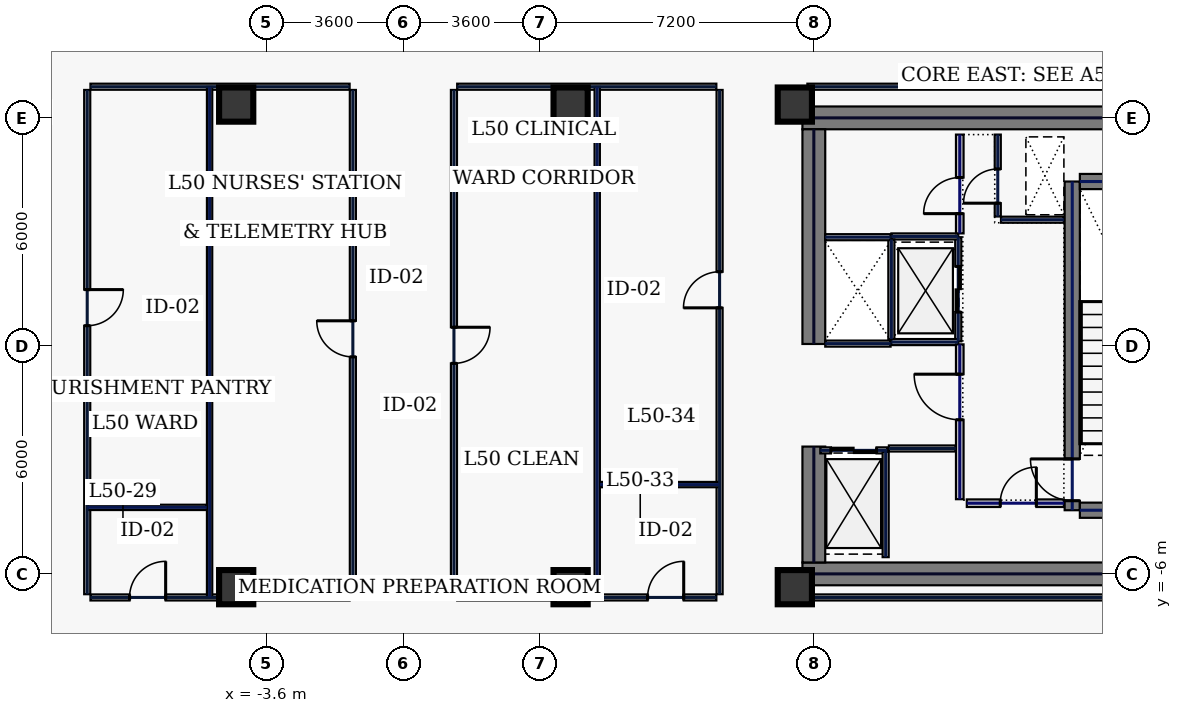
"""IFC4 building model, lengths in metres.
Left out: names, types, materials, properties, quantities, classifications, styles, units other than length and angle.
Written with IfcOpenShell. Run it as: python <this file> out.ifc"""

import sys

from ifc_helpers import new_model, si_unit, direction, frame, frame_2d, origin, origin_2d, place, context, subcontext, project, spatial, rectangle, hollow_rectangle, extrude, element, fill, save


model = new_model("IFC4")
c1 = context("Model", 3, precision=1e-05, world=origin(), true_north=direction((0.0, 1.0)))
c2 = subcontext(c1, "Body", "Model", "MODEL_VIEW")
j1 = project(units=[si_unit("LENGTHUNIT", "METRE"), si_unit("PLANEANGLEUNIT", "RADIAN")], contexts=[c1])
p1 = place(None, origin())
s1 = spatial("IfcSite", under=j1, at=p1, CompositionType="ELEMENT")
p2 = place(p1, origin())
s2 = spatial("IfcBuilding", under=s1, at=p2, CompositionType="ELEMENT")
p3 = place(p2, frame((0.0, 0.0, 218.2)))
s3 = spatial("IfcBuildingStorey", under=s2, at=p3, CompositionType="ELEMENT", Elevation=218.2)
for number, where, z_axis, x_axis in (
    (1, (10.5, 6.0, 0.0), (0.0, 0.0, 1.0), (1.0, 0.0, 0.0)),
    (2, (10.5, -6.0, 0.0), (0.0, 0.0, 1.0), (1.0, 0.0, 0.0)),
):
    element("IfcWall", number, at=place(p3, frame(where, z_axis=z_axis, x_axis=x_axis)), inside=s3, PredefinedType="SHEAR", context=c2, shape_type="SweptSolid", body=[
        extrude(rectangle(XDim=11.5, YDim=0.6, at=frame_2d((5.75, 0.0))), origin(), (0.0, 0.0, 1.0), 3.74),
    ])
p4 = place(p3, frame((10.8, -5.7, 0.0), z_axis=(0.0, 0.0, 1.0), x_axis=(0.0, 1.0, 0.0)))
e3 = element("IfcWall", 3, at=p4, inside=s3, PredefinedType="SHEAR", context=c2, shape_type="SweptSolid", body=[
    extrude(rectangle(XDim=3.05, YDim=0.6, at=frame_2d((1.525, 0.0))), origin(), (0.0, 0.0, 1.0), 3.74),
])
p5 = place(p3, frame((10.8, 0.05, 0.0), z_axis=(0.0, 0.0, 1.0), x_axis=(0.0, 1.0, 0.0)))
e4 = element("IfcWall", 4, at=p5, inside=s3, PredefinedType="SHEAR", context=c2, shape_type="SweptSolid", body=[
    extrude(rectangle(XDim=5.65, YDim=0.6, at=frame_2d((2.825, 0.0))), origin(), (0.0, 0.0, 1.0), 3.74),
])
p6 = place(p3, frame((17.6, -4.325, 0.0), z_axis=(0.0, 0.0, 1.0), x_axis=(0.0, 1.0, 0.0)))
e5 = element("IfcWall", 5, at=p6, inside=s3, PredefinedType="SHEAR", context=c2, shape_type="SweptSolid", body=[
    extrude(rectangle(XDim=8.65, YDim=0.4, at=frame_2d((4.325, 0.0))), origin(), (0.0, 0.0, 1.0), 3.74),
])
p7 = place(p6, frame((0.25, 0.0, 0.0)))
e6 = element("IfcOpeningElement", 6, at=p7, cuts=e5, PredefinedType="OPENING", context=c2, shape_type="SweptSolid", body=[
    extrude(rectangle(XDim=1.1, YDim=2.2, at=frame_2d((0.55, 1.1))), frame((0.0, 0.21, 0.0), z_axis=(0.0, -1.0, 0.0), x_axis=(1.0, 0.0, 0.0)), (0.0, 0.0, 1.0), 0.42),
])
for number, where, z_axis, x_axis in (
    (7, (17.8, -4.325, 0.0), (0.0, 0.0, 1.0), (1.0, 0.0, 0.0)),
    (8, (17.8, 4.325, 0.0), (0.0, 0.0, 1.0), (1.0, 0.0, 0.0)),
):
    element("IfcWall", number, at=place(p3, frame(where, z_axis=z_axis, x_axis=x_axis)), inside=s3, PredefinedType="SHEAR", context=c2, shape_type="SweptSolid", body=[
        extrude(rectangle(XDim=3.4, YDim=0.4, at=frame_2d((1.7, 0.0))), origin(), (0.0, 0.0, 1.0), 3.74),
    ])
for number, where, z_axis, x_axis in (
    (9, (10.3, -6.35, 0.0), (0.0, 0.0, 1.0), (1.0, 0.0, 0.0)),
    (10, (10.3, 6.35, 0.0), (0.0, 0.0, 1.0), (1.0, 0.0, 0.0)),
    (11, (-4.4, -6.35, 0.0), (0.0, 0.0, 1.0), (1.0, 0.0, 0.0)),
    (12, (4.4, -6.35, 0.0), (0.0, 0.0, 1.0), (1.0, 0.0, 0.0)),
    (13, (-4.4, 6.35, 0.0), (0.0, 0.0, 1.0), (1.0, 0.0, 0.0)),
    (14, (4.4, 6.35, 0.0), (0.0, 0.0, 1.0), (1.0, 0.0, 0.0)),
):
    element("IfcColumn", number, at=place(p3, frame(where, z_axis=z_axis, x_axis=x_axis)), inside=s3, PredefinedType="COLUMN", context=c2, shape_type="SweptSolid", body=[
        extrude(hollow_rectangle(XDim=0.9, YDim=0.9, WallThickness=0.04, at=origin_2d()), origin(), (0.0, 0.0, 1.0), 3.74),
    ])
p8 = place(p3, frame((14.6, 0.12, 0.0), z_axis=(0.0, 0.0, 1.0), x_axis=(0.0, 1.0, 0.0)))
e15 = element("IfcWall", 15, at=p8, inside=s3, PredefinedType="PARTITIONING", context=c2, shape_type="SweptSolid", body=[
    extrude(rectangle(XDim=2.74, YDim=0.16, at=frame_2d((1.37, 0.0))), origin(), (0.0, 0.0, 1.0), 3.74),
])
p9 = place(p8, frame((0.77, 0.0, 0.0)))
e16 = element("IfcOpeningElement", 16, at=p9, cuts=e15, PredefinedType="OPENING", context=c2, shape_type="SweptSolid", body=[
    extrude(rectangle(XDim=1.2, YDim=2.2, at=frame_2d((0.6, 1.1))), frame((0.0, 0.09, 0.0), z_axis=(0.0, -1.0, 0.0), x_axis=(1.0, 0.0, 0.0)), (0.0, 0.0, 1.0), 0.18),
])
for number, where, z_axis, x_axis in (
    (17, (12.84, 0.1, 0.0), (0.0, 0.0, 1.0), (1.0, 0.0, 0.0)),
    (18, (12.84, 2.88, 0.0), (0.0, 0.0, 1.0), (1.0, 0.0, 0.0)),
):
    element("IfcWall", number, at=place(p3, frame(where, z_axis=z_axis, x_axis=x_axis)), inside=s3, PredefinedType="PARTITIONING", context=c2, shape_type="SweptSolid", body=[
        extrude(rectangle(XDim=1.76, YDim=0.16, at=frame_2d((0.88, 0.0))), origin(), (0.0, 0.0, 1.0), 3.74),
    ])
p10 = place(p3, frame((12.84, 0.18, 0.0), z_axis=(0.0, 0.0, 1.0), x_axis=(0.0, 1.0, 0.0)))
e19 = element("IfcWall", 19, at=p10, inside=s3, PredefinedType="PARTITIONING", context=c2, shape_type="SweptSolid", body=[
    extrude(rectangle(XDim=2.62, YDim=0.16, at=frame_2d((1.31, 0.0))), origin(), (0.0, 0.0, 1.0), 3.74),
])
p11 = place(p3, frame((10.97, -2.75, 0.0), z_axis=(0.0, 0.0, 1.0), x_axis=(1.0, 0.0, 0.0)))
e20 = element("IfcWall", 20, at=p11, inside=s3, PredefinedType="PARTITIONING", context=c2, shape_type="SweptSolid", body=[
    extrude(rectangle(XDim=1.76, YDim=0.16, at=frame_2d((0.88, 0.0))), origin(), (0.0, 0.0, 1.0), 3.74),
])
p12 = place(p11, frame((0.28, 0.0, 0.0)))
e21 = element("IfcOpeningElement", 21, at=p12, cuts=e20, PredefinedType="OPENING", context=c2, shape_type="SweptSolid", body=[
    extrude(rectangle(XDim=1.2, YDim=2.2, at=frame_2d((0.6, 1.1))), frame((0.0, 0.09, 0.0), z_axis=(0.0, -1.0, 0.0), x_axis=(1.0, 0.0, 0.0)), (0.0, 0.0, 1.0), 0.18),
])
for number, where, z_axis, x_axis in (
    (22, (11.1, 0.06, 0.0), (0.0, 0.0, 1.0), (1.0, 0.0, 0.0)),
    (23, (11.1, 2.86, 0.0), (0.0, 0.0, 1.0), (1.0, 0.0, 0.0)),
):
    element("IfcWall", number, at=place(p3, frame(where, z_axis=z_axis, x_axis=x_axis)), inside=s3, PredefinedType="PARTITIONING", context=c2, shape_type="SweptSolid", body=[
        extrude(rectangle(XDim=1.72, YDim=0.16, at=frame_2d((0.86, 0.0))), origin(), (0.0, 0.0, 1.0), 3.74),
    ])
p13 = place(p3, frame((15.64, 3.405, 0.0), z_axis=(0.0, 0.0, 1.0), x_axis=(0.0, 1.0, 0.0)))
e24 = element("IfcWall", 24, at=p13, inside=s3, PredefinedType="PARTITIONING", context=c2, shape_type="SweptSolid", body=[
    extrude(rectangle(XDim=2.155, YDim=0.16, at=frame_2d((1.078, 0.0))), origin(), (0.0, 0.0, 1.0), 3.74),
])
p14 = place(p13, frame((0.35, 0.0, 0.0)))
e25 = element("IfcOpeningElement", 25, at=p14, cuts=e24, PredefinedType="OPENING", context=c2, shape_type="SweptSolid", body=[
    extrude(rectangle(XDim=0.9, YDim=2.2, at=frame_2d((0.45, 1.1))), frame((0.0, 0.09, 0.0), z_axis=(0.0, -1.0, 0.0), x_axis=(1.0, 0.0, 0.0)), (0.0, 0.0, 1.0), 0.18),
])
p15 = place(p3, frame((15.725, 3.32, 0.0), z_axis=(0.0, 0.0, 1.0), x_axis=(1.0, 0.0, 0.0)))
e26 = element("IfcWall", 26, at=p15, inside=s3, PredefinedType="PARTITIONING", context=c2, shape_type="SweptSolid", body=[
    extrude(rectangle(XDim=1.655, YDim=0.16, at=frame_2d((0.827, 0.0))), origin(), (0.0, 0.0, 1.0), 3.74),
])
p16 = place(p3, frame((14.825, -4.14, 0.0), z_axis=(0.0, 0.0, 1.0), x_axis=(1.0, 0.0, 0.0)))
e27 = element("IfcWall", 27, at=p16, inside=s3, PredefinedType="SOLIDWALL", context=c2, shape_type="SweptSolid", body=[
    extrude(rectangle(XDim=2.555, YDim=0.2, at=frame_2d((1.277, 0.0))), origin(), (0.0, 0.0, 1.0), 3.74),
])
p17 = place(p16, frame((0.88, 0.0, 0.0)))
e28 = element("IfcOpeningElement", 28, at=p17, cuts=e27, PredefinedType="OPENING", context=c2, shape_type="SweptSolid", body=[
    extrude(rectangle(XDim=0.95, YDim=2.2, at=frame_2d((0.475, 1.1))), frame((0.0, 0.11, 0.0), z_axis=(0.0, -1.0, 0.0), x_axis=(1.0, 0.0, 0.0)), (0.0, 0.0, 1.0), 0.22),
])
p18 = place(p3, frame((12.775, -2.7, 0.0), z_axis=(0.0, 0.0, 1.0), x_axis=(1.0, 0.0, 0.0)))
e29 = element("IfcWall", 29, at=p18, inside=s3, PredefinedType="PARTITIONING", context=c2, shape_type="SweptSolid", body=[
    extrude(rectangle(XDim=1.76, YDim=0.16, at=frame_2d((0.88, 0.0))), origin(), (0.0, 0.0, 1.0), 3.74),
])
p19 = place(p3, frame((12.69, -5.56, 0.0), z_axis=(0.0, 0.0, 1.0), x_axis=(0.0, 1.0, 0.0)))
e30 = element("IfcWall", 30, at=p19, inside=s3, PredefinedType="PARTITIONING", context=c2, shape_type="SweptSolid", body=[
    extrude(rectangle(XDim=2.775, YDim=0.16, at=frame_2d((1.388, 0.0))), origin(), (0.0, 0.0, 1.0), 3.74),
])
p20 = place(p3, frame((14.64, 2.96, 0.0), z_axis=(0.0, 0.0, 1.0), x_axis=(0.0, 1.0, 0.0)))
e31 = element("IfcWall", 31, at=p20, inside=s3, PredefinedType="SOLIDWALL", context=c2, shape_type="SweptSolid", body=[
    extrude(rectangle(XDim=2.6, YDim=0.2, at=frame_2d((1.3, 0.0))), origin(), (0.0, 0.0, 1.0), 3.74),
])
p21 = place(p20, frame((0.52, 0.0, 0.0)))
e32 = element("IfcOpeningElement", 32, at=p21, cuts=e31, PredefinedType="OPENING", context=c2, shape_type="SweptSolid", body=[
    extrude(rectangle(XDim=0.95, YDim=2.2, at=frame_2d((0.475, 1.1))), frame((0.0, 0.11, 0.0), z_axis=(0.0, -1.0, 0.0), x_axis=(1.0, 0.0, 0.0)), (0.0, 0.0, 1.0), 0.22),
])
p22 = place(p3, frame((14.64, -4.035, 0.0), z_axis=(0.0, 0.0, 1.0), x_axis=(0.0, 1.0, 0.0)))
e33 = element("IfcWall", 33, at=p22, inside=s3, PredefinedType="SOLIDWALL", context=c2, shape_type="SweptSolid", body=[
    extrude(rectangle(XDim=4.075, YDim=0.2, at=frame_2d((2.038, 0.0))), origin(), (0.0, 0.0, 1.0), 3.74),
])
p23 = place(p22, frame((2.09, 0.0, 0.0)))
e34 = element("IfcOpeningElement", 34, at=p23, cuts=e33, PredefinedType="OPENING", context=c2, shape_type="SweptSolid", body=[
    extrude(rectangle(XDim=1.2, YDim=2.2, at=frame_2d((0.6, 1.1))), frame((0.0, 0.11, 0.0), z_axis=(0.0, -1.0, 0.0), x_axis=(1.0, 0.0, 0.0)), (0.0, 0.0, 1.0), 0.22),
])
for number, where, z_axis, x_axis in (
    (35, (24.815, 6.82, 0.0), (0.0, 0.0, 1.0), (-1.0, 0.0, 0.0)),
    (36, (10.63, -6.62, 0.0), (0.0, 0.0, 1.0), (1.0, 0.0, 0.0)),
):
    element("IfcWall", number, at=place(p3, frame(where, z_axis=z_axis, x_axis=x_axis)), inside=s3, PredefinedType="PARTITIONING", context=c2, shape_type="SweptSolid", body=[
        extrude(rectangle(XDim=14.185, YDim=0.16, at=frame_2d((7.093, 0.0))), origin(), (0.0, 0.0, 1.0), 3.74),
    ])
p24 = place(p3, frame((8.235, 6.82, 0.0), z_axis=(0.0, 0.0, 1.0), x_axis=(-1.0, 0.0, 0.0)))
e37 = element("IfcWall", 37, at=p24, inside=s3, PredefinedType="PARTITIONING", context=c2, shape_type="SweptSolid", body=[
    extrude(rectangle(XDim=6.82, YDim=0.16, at=frame_2d((3.41, 0.0))), origin(), (0.0, 0.0, 1.0), 3.74),
])
p25 = place(p3, frame((1.33, 6.735, 0.0), z_axis=(0.0, 0.0, 1.0), x_axis=(0.0, -1.0, 0.0)))
e38 = element("IfcWall", 38, at=p25, inside=s3, PredefinedType="PARTITIONING", context=c2, shape_type="SweptSolid", body=[
    extrude(rectangle(XDim=13.27, YDim=0.16, at=frame_2d((6.635, 0.0))), origin(), (0.0, 0.0, 1.0), 3.74),
])
p26 = place(p25, frame((6.245, 0.0, 0.0)))
e39 = element("IfcOpeningElement", 39, at=p26, cuts=e38, PredefinedType="OPENING", context=c2, shape_type="SweptSolid", body=[
    extrude(rectangle(XDim=0.95, YDim=2.2, at=frame_2d((0.475, 1.1))), frame((0.0, 0.09, 0.0), z_axis=(0.0, -1.0, 0.0), x_axis=(1.0, 0.0, 0.0)), (0.0, 0.0, 1.0), 0.18),
])
p27 = place(p3, frame((1.415, -6.62, 0.0), z_axis=(0.0, 0.0, 1.0), x_axis=(1.0, 0.0, 0.0)))
e40 = element("IfcWall", 40, at=p27, inside=s3, PredefinedType="PARTITIONING", context=c2, shape_type="SweptSolid", body=[
    extrude(rectangle(XDim=6.82, YDim=0.16, at=frame_2d((3.41, 0.0))), origin(), (0.0, 0.0, 1.0), 3.74),
])
p28 = place(p27, frame((5.011, 0.0, 0.0)))
e41 = element("IfcOpeningElement", 41, at=p28, cuts=e40, PredefinedType="OPENING", context=c2, shape_type="SweptSolid", body=[
    extrude(rectangle(XDim=0.95, YDim=2.2, at=frame_2d((0.475, 1.1))), frame((0.0, 0.09, 0.0), z_axis=(0.0, -1.0, 0.0), x_axis=(1.0, 0.0, 0.0)), (0.0, 0.0, 1.0), 0.18),
])
p29 = place(p3, frame((8.32, -6.535, 0.0), z_axis=(0.0, 0.0, 1.0), x_axis=(0.0, 1.0, 0.0)))
e42 = element("IfcWall", 42, at=p29, inside=s3, PredefinedType="PARTITIONING", context=c2, shape_type="SweptSolid", body=[
    extrude(rectangle(XDim=13.27, YDim=0.16, at=frame_2d((6.635, 0.0))), origin(), (0.0, 0.0, 1.0), 3.74),
])
p30 = place(p29, frame((7.536, 0.0, 0.0)))
e43 = element("IfcOpeningElement", 43, at=p30, cuts=e42, PredefinedType="OPENING", context=c2, shape_type="SweptSolid", body=[
    extrude(rectangle(XDim=0.95, YDim=2.2, at=frame_2d((0.475, 1.1))), frame((0.0, 0.09, 0.0), z_axis=(0.0, -1.0, 0.0), x_axis=(1.0, 0.0, 0.0)), (0.0, 0.0, 1.0), 0.18),
])
p31 = place(p3, frame((-1.33, -6.535, 0.0), z_axis=(0.0, 0.0, 1.0), x_axis=(0.0, 1.0, 0.0)))
e44 = element("IfcWall", 44, at=p31, inside=s3, PredefinedType="PARTITIONING", context=c2, shape_type="SweptSolid", body=[
    extrude(rectangle(XDim=13.27, YDim=0.16, at=frame_2d((6.635, 0.0))), origin(), (0.0, 0.0, 1.0), 3.74),
])
p32 = place(p31, frame((6.245, 0.0, 0.0)))
e45 = element("IfcOpeningElement", 45, at=p32, cuts=e44, PredefinedType="OPENING", context=c2, shape_type="SweptSolid", body=[
    extrude(rectangle(XDim=0.95, YDim=2.2, at=frame_2d((0.475, 1.1))), frame((0.0, 0.09, 0.0), z_axis=(0.0, -1.0, 0.0), x_axis=(1.0, 0.0, 0.0)), (0.0, 0.0, 1.0), 0.18),
])
p33 = place(p3, frame((-1.415, 6.82, 0.0), z_axis=(0.0, 0.0, 1.0), x_axis=(-1.0, 0.0, 0.0)))
e46 = element("IfcWall", 46, at=p33, inside=s3, PredefinedType="PARTITIONING", context=c2, shape_type="SweptSolid", body=[
    extrude(rectangle(XDim=6.82, YDim=0.16, at=frame_2d((3.41, 0.0))), origin(), (0.0, 0.0, 1.0), 3.74),
])
p34 = place(p3, frame((-8.32, 6.735, 0.0), z_axis=(0.0, 0.0, 1.0), x_axis=(0.0, -1.0, 0.0)))
e47 = element("IfcWall", 47, at=p34, inside=s3, PredefinedType="PARTITIONING", context=c2, shape_type="SweptSolid", body=[
    extrude(rectangle(XDim=13.27, YDim=0.16, at=frame_2d((6.635, 0.0))), origin(), (0.0, 0.0, 1.0), 3.74),
])
p35 = place(p34, frame((5.254, 0.0, 0.0)))
e48 = element("IfcOpeningElement", 48, at=p35, cuts=e47, PredefinedType="OPENING", context=c2, shape_type="SweptSolid", body=[
    extrude(rectangle(XDim=0.95, YDim=2.2, at=frame_2d((0.475, 1.1))), frame((0.0, 0.09, 0.0), z_axis=(0.0, -1.0, 0.0), x_axis=(1.0, 0.0, 0.0)), (0.0, 0.0, 1.0), 0.18),
])
p36 = place(p3, frame((-8.235, -6.62, 0.0), z_axis=(0.0, 0.0, 1.0), x_axis=(1.0, 0.0, 0.0)))
e49 = element("IfcWall", 49, at=p36, inside=s3, PredefinedType="PARTITIONING", context=c2, shape_type="SweptSolid", body=[
    extrude(rectangle(XDim=6.82, YDim=0.16, at=frame_2d((3.41, 0.0))), origin(), (0.0, 0.0, 1.0), 3.74),
])
p37 = place(p36, frame((1.029, 0.0, 0.0)))
e50 = element("IfcOpeningElement", 50, at=p37, cuts=e49, PredefinedType="OPENING", context=c2, shape_type="SweptSolid", body=[
    extrude(rectangle(XDim=0.95, YDim=2.2, at=frame_2d((0.475, 1.1))), frame((0.0, 0.09, 0.0), z_axis=(0.0, -1.0, 0.0), x_axis=(1.0, 0.0, 0.0)), (0.0, 0.0, 1.0), 0.18),
])
for number, where, z_axis, x_axis in (
    (51, (-5.1, -6.615, 0.0), (0.0, 0.0, 1.0), (0.0, 1.0, 0.0)),
    (52, (5.1, -6.615, 0.0), (0.0, 0.0, 1.0), (0.0, 1.0, 0.0)),
):
    element("IfcWall", number, at=place(p3, frame(where, z_axis=z_axis, x_axis=x_axis)), inside=s3, PredefinedType="PARTITIONING", context=c2, shape_type="SweptSolid", body=[
        extrude(rectangle(XDim=13.43, YDim=0.14, at=frame_2d((6.715, 0.0))), origin(), (0.0, 0.0, 1.0), 3.74),
    ])
for number, where, z_axis, x_axis in (
    (53, (-8.315, -4.25, 0.0), (0.0, 0.0, 1.0), (1.0, 0.0, 0.0)),
    (54, (5.175, -3.65, 0.0), (0.0, 0.0, 1.0), (1.0, 0.0, 0.0)),
):
    element("IfcWall", number, at=place(p3, frame(where, z_axis=z_axis, x_axis=x_axis)), inside=s3, PredefinedType="PARTITIONING", context=c2, shape_type="SweptSolid", body=[
        extrude(rectangle(XDim=3.14, YDim=0.14, at=frame_2d((1.57, 0.0))), origin(), (0.0, 0.0, 1.0), 3.74),
    ])
p38 = place(p7, origin())
e55 = element("IfcDoor", 55, at=p38, inside=s3, OperationType="SINGLE_SWING_RIGHT", PredefinedType="DOOR", context=c2, shape_type="SweptSolid", body=[
    extrude(rectangle(XDim=1.1, YDim=2.2, at=frame_2d((0.55, 1.1))), frame((0.0, 0.025, 0.0), z_axis=(0.0, -1.0, 0.0), x_axis=(1.0, 0.0, 0.0)), (0.0, 0.0, 1.0), 0.05),
])
fill(e6, e55)
p39 = place(p9, origin())
e56 = element("IfcDoor", 56, at=p39, inside=s3, OperationType="SLIDING_TO_LEFT", PredefinedType="DOOR", context=c2, shape_type="SweptSolid", body=[
    extrude(rectangle(XDim=1.2, YDim=2.2, at=frame_2d((0.6, 1.1))), frame((0.0, 0.025, 0.0), z_axis=(0.0, -1.0, 0.0), x_axis=(1.0, 0.0, 0.0)), (0.0, 0.0, 1.0), 0.05),
])
fill(e16, e56)
p40 = place(p12, origin())
e57 = element("IfcDoor", 57, at=p40, inside=s3, OperationType="SLIDING_TO_LEFT", PredefinedType="DOOR", context=c2, shape_type="SweptSolid", body=[
    extrude(rectangle(XDim=1.2, YDim=2.2, at=frame_2d((0.6, 1.1))), frame((0.0, 0.025, 0.0), z_axis=(0.0, -1.0, 0.0), x_axis=(1.0, 0.0, 0.0)), (0.0, 0.0, 1.0), 0.05),
])
fill(e21, e57)
p41 = place(p14, origin())
e58 = element("IfcDoor", 58, at=p41, inside=s3, OperationType="SINGLE_SWING_LEFT", PredefinedType="DOOR", context=c2, shape_type="SweptSolid", body=[
    extrude(rectangle(XDim=0.9, YDim=2.2, at=frame_2d((0.45, 1.1))), frame((0.0, 0.025, 0.0), z_axis=(0.0, -1.0, 0.0), x_axis=(1.0, 0.0, 0.0)), (0.0, 0.0, 1.0), 0.05),
])
fill(e25, e58)
p42 = place(p17, origin())
e59 = element("IfcDoor", 59, at=p42, inside=s3, OperationType="SINGLE_SWING_RIGHT", PredefinedType="DOOR", context=c2, shape_type="SweptSolid", body=[
    extrude(rectangle(XDim=0.95, YDim=2.2, at=frame_2d((0.475, 1.1))), frame((0.0, 0.025, 0.0), z_axis=(0.0, -1.0, 0.0), x_axis=(1.0, 0.0, 0.0)), (0.0, 0.0, 1.0), 0.05),
])
fill(e28, e59)
p43 = place(p21, origin())
e60 = element("IfcDoor", 60, at=p43, inside=s3, OperationType="SINGLE_SWING_LEFT", PredefinedType="DOOR", context=c2, shape_type="SweptSolid", body=[
    extrude(rectangle(XDim=0.95, YDim=2.2, at=frame_2d((0.475, 1.1))), frame((0.0, 0.025, 0.0), z_axis=(0.0, -1.0, 0.0), x_axis=(1.0, 0.0, 0.0)), (0.0, 0.0, 1.0), 0.05),
])
fill(e32, e60)
p44 = place(p23, origin())
e61 = element("IfcDoor", 61, at=p44, inside=s3, OperationType="SINGLE_SWING_RIGHT", PredefinedType="DOOR", context=c2, shape_type="SweptSolid", body=[
    extrude(rectangle(XDim=1.2, YDim=2.2, at=frame_2d((0.6, 1.1))), frame((0.0, 0.025, 0.0), z_axis=(0.0, -1.0, 0.0), x_axis=(1.0, 0.0, 0.0)), (0.0, 0.0, 1.0), 0.05),
])
fill(e34, e61)
p45 = place(p37, origin())
e62 = element("IfcDoor", 62, at=p45, inside=s3, OperationType="SINGLE_SWING_RIGHT", PredefinedType="DOOR", context=c2, shape_type="SweptSolid", body=[
    extrude(rectangle(XDim=0.95, YDim=2.2, at=frame_2d((0.475, 1.1))), frame((0.0, 0.025, 0.0), z_axis=(0.0, -1.0, 0.0), x_axis=(1.0, 0.0, 0.0)), (0.0, 0.0, 1.0), 0.05),
])
fill(e50, e62)
p46 = place(p35, origin())
e63 = element("IfcDoor", 63, at=p46, inside=s3, OperationType="SINGLE_SWING_LEFT", PredefinedType="DOOR", context=c2, shape_type="SweptSolid", body=[
    extrude(rectangle(XDim=0.95, YDim=2.2, at=frame_2d((0.475, 1.1))), frame((0.0, 0.025, 0.0), z_axis=(0.0, -1.0, 0.0), x_axis=(1.0, 0.0, 0.0)), (0.0, 0.0, 1.0), 0.05),
])
fill(e48, e63)
p47 = place(p32, origin())
e64 = element("IfcDoor", 64, at=p47, inside=s3, OperationType="SINGLE_SWING_RIGHT", PredefinedType="DOOR", context=c2, shape_type="SweptSolid", body=[
    extrude(rectangle(XDim=0.95, YDim=2.2, at=frame_2d((0.475, 1.1))), frame((0.0, 0.025, 0.0), z_axis=(0.0, -1.0, 0.0), x_axis=(1.0, 0.0, 0.0)), (0.0, 0.0, 1.0), 0.05),
])
fill(e45, e64)
p48 = place(p26, origin())
e65 = element("IfcDoor", 65, at=p48, inside=s3, OperationType="SINGLE_SWING_LEFT", PredefinedType="DOOR", context=c2, shape_type="SweptSolid", body=[
    extrude(rectangle(XDim=0.95, YDim=2.2, at=frame_2d((0.475, 1.1))), frame((0.0, 0.025, 0.0), z_axis=(0.0, -1.0, 0.0), x_axis=(1.0, 0.0, 0.0)), (0.0, 0.0, 1.0), 0.05),
])
fill(e39, e65)
p49 = place(p28, origin())
e66 = element("IfcDoor", 66, at=p49, inside=s3, OperationType="SINGLE_SWING_RIGHT", PredefinedType="DOOR", context=c2, shape_type="SweptSolid", body=[
    extrude(rectangle(XDim=0.95, YDim=2.2, at=frame_2d((0.475, 1.1))), frame((0.0, 0.025, 0.0), z_axis=(0.0, -1.0, 0.0), x_axis=(1.0, 0.0, 0.0)), (0.0, 0.0, 1.0), 0.05),
])
fill(e41, e66)
p50 = place(p30, origin())
e67 = element("IfcDoor", 67, at=p50, inside=s3, OperationType="SINGLE_SWING_LEFT", PredefinedType="DOOR", context=c2, shape_type="SweptSolid", body=[
    extrude(rectangle(XDim=0.95, YDim=2.2, at=frame_2d((0.475, 1.1))), frame((0.0, 0.025, 0.0), z_axis=(0.0, -1.0, 0.0), x_axis=(1.0, 0.0, 0.0)), (0.0, 0.0, 1.0), 0.05),
])
fill(e43, e67)
save(model, sys.argv[1])
